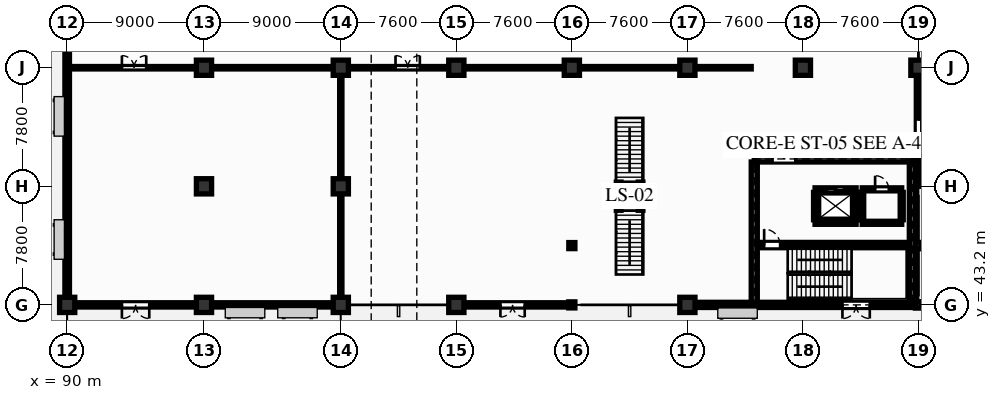
"""IFC4 building model, lengths in metres.
Left out: names, types, materials, properties, quantities, classifications, styles, units other than length and angle.
Written with IfcOpenShell. Run it as: python <this file> out.ifc"""

import sys

from ifc_helpers import new_model, si_unit, direction, frame, frame_2d, origin, origin_2d, place, context, subcontext, project, spatial, rectangle, i_section, extrude, element, fill, save


model = new_model("IFC4")
c1 = context("Model", 3, precision=1e-05, world=origin(), true_north=direction((0.0, 1.0)))
c2 = subcontext(c1, "Body", "Model", "MODEL_VIEW")
j1 = project(units=[si_unit("LENGTHUNIT", "METRE"), si_unit("PLANEANGLEUNIT", "RADIAN")], contexts=[c1])
p1 = place(None, origin())
s1 = spatial("IfcSite", under=j1, at=p1, CompositionType="ELEMENT")
p2 = place(p1, origin())
s2 = spatial("IfcBuilding", under=s1, at=p2, CompositionType="ELEMENT")
p3 = place(p2, origin())
s3 = spatial("IfcBuildingStorey", under=s2, at=p3, CompositionType="ELEMENT", Elevation=0.0)
for number, where, z_axis, x_axis in (
    (1, (90.0, 43.2, 0.0), (0.0, 0.0, 1.0), (1.0, 0.0, 0.0)),
    (2, (99.0, 43.2, 0.0), (0.0, 0.0, 1.0), (1.0, 0.0, 0.0)),
    (3, (99.0, 51.0, 0.0), (0.0, 0.0, 1.0), (1.0, 0.0, 0.0)),
    (4, (99.0, 58.8, 0.0), (0.0, 0.0, 1.0), (1.0, 0.0, 0.0)),
    (5, (108.0, 43.2, 0.0), (0.0, 0.0, 1.0), (1.0, 0.0, 0.0)),
    (6, (108.0, 51.0, 0.0), (0.0, 0.0, 1.0), (1.0, 0.0, 0.0)),
    (7, (108.0, 58.8, 0.0), (0.0, 0.0, 1.0), (1.0, 0.0, 0.0)),
    (8, (115.6, 43.2, 0.0), (0.0, 0.0, 1.0), (1.0, 0.0, 0.0)),
    (9, (115.6, 58.8, 0.0), (0.0, 0.0, 1.0), (1.0, 0.0, 0.0)),
):
    element("IfcColumn", number, at=place(p3, frame(where, z_axis=z_axis, x_axis=x_axis)), inside=s3, PredefinedType="COLUMN", context=c2, shape_type="SweptSolid", body=[
        extrude(rectangle(XDim=1.0, YDim=1.0, at=origin_2d()), origin(), (0.0, 0.0, 1.0), 5.1),
    ])
p4 = place(p3, frame((123.2, 43.2, 0.0), z_axis=(0.0, 0.0, 1.0), x_axis=(1.0, 0.0, 0.0)))
e10 = element("IfcColumn", 10, at=p4, inside=s3, PredefinedType="COLUMN", context=c2, shape_type="SweptSolid", body=[
    extrude(i_section(OverallWidth=0.401, OverallDepth=0.399, WebThickness=0.025, FlangeThickness=0.04, at=origin_2d()), origin(), (0.0, 0.0, 1.0), 5.1),
])
for number, where, z_axis, x_axis in (
    (11, (123.2, 58.8, 0.0), (0.0, 0.0, 1.0), (1.0, 0.0, 0.0)),
    (12, (130.8, 43.2, 0.0), (0.0, 0.0, 1.0), (1.0, 0.0, 0.0)),
    (13, (130.8, 58.8, 0.0), (0.0, 0.0, 1.0), (1.0, 0.0, 0.0)),
    (14, (138.4, 58.8, 0.0), (0.0, 0.0, 1.0), (1.0, 0.0, 0.0)),
    (15, (146.0, 58.8, 0.0), (0.0, 0.0, 1.0), (1.0, 0.0, 0.0)),
):
    element("IfcColumn", number, at=place(p3, frame(where, z_axis=z_axis, x_axis=x_axis)), inside=s3, PredefinedType="COLUMN", context=c2, shape_type="SweptSolid", body=[
        extrude(rectangle(XDim=1.0, YDim=1.0, at=origin_2d()), origin(), (0.0, 0.0, 1.0), 5.1),
    ])
p5 = place(p3, frame((123.2, 47.1, 0.0), z_axis=(0.0, 0.0, 1.0), x_axis=(1.0, 0.0, 0.0)))
e16 = element("IfcColumn", 16, at=p5, inside=s3, PredefinedType="COLUMN", context=c2, shape_type="SweptSolid", body=[
    extrude(i_section(OverallWidth=0.401, OverallDepth=0.399, WebThickness=0.025, FlangeThickness=0.04, at=origin_2d()), origin(), (0.0, 0.0, 1.0), 5.1),
])
for number, where, z_axis, x_axis in (
    (17, (146.0, 47.1, 0.0), (0.0, 0.0, 1.0), (1.0, 0.0, 0.0)),
    (18, (146.0, 43.2, 0.0), (0.0, 0.0, 1.0), (1.0, 0.0, 0.0)),
):
    element("IfcColumn", number, at=place(p3, frame(where, z_axis=z_axis, x_axis=x_axis)), inside=s3, PredefinedType="COLUMN", context=c2, shape_type="SweptSolid", body=[
        extrude(i_section(OverallWidth=0.406, OverallDepth=0.417, WebThickness=0.03, FlangeThickness=0.048, at=origin_2d()), origin(), (0.0, 0.0, 1.0), 5.1),
    ])
for number, where, z_axis, x_axis in (
    (19, (126.28, 49.58, 0.0), (0.0, 0.0, 1.0), (1.0, 0.0, 0.0)),
    (20, (127.72, 49.58, 0.0), (0.0, 0.0, 1.0), (1.0, 0.0, 0.0)),
    (21, (126.28, 51.12, 0.0), (0.0, 0.0, 1.0), (1.0, 0.0, 0.0)),
    (22, (127.72, 51.12, 0.0), (0.0, 0.0, 1.0), (1.0, 0.0, 0.0)),
):
    element("IfcColumn", number, at=place(p3, frame(where, z_axis=z_axis, x_axis=x_axis)), inside=s3, PredefinedType="COLUMN", context=c2, shape_type="SweptSolid", body=[
        extrude(i_section(OverallWidth=0.307, OverallDepth=0.315, WebThickness=0.012, FlangeThickness=0.019, at=origin_2d()), origin(), (0.0, 0.0, 1.0), 2.33),
    ])
p6 = place(p3, frame((90.0, 43.2, 0.0), z_axis=(0.0, 0.0, 1.0), x_axis=(0.0, 1.0, 0.0)))
e23 = element("IfcWall", 23, at=p6, inside=s3, PredefinedType="SOLIDWALL", context=c2, shape_type="SweptSolid", body=[
    extrude(rectangle(XDim=31.2, YDim=0.3, at=frame_2d((15.6, 0.0))), origin(), (0.0, 0.0, 1.0), 5.25),
])
p7 = place(p6, frame((3.5, 0.0, 0.9)))
e24 = element("IfcOpeningElement", 24, at=p7, cuts=e23, PredefinedType="OPENING", context=c2, shape_type="SweptSolid", body=[
    extrude(rectangle(XDim=1.6, YDim=2.05, at=frame_2d((0.8, 1.025))), frame((0.0, 0.16, 0.0), z_axis=(0.0, -1.0, 0.0), x_axis=(1.0, 0.0, 0.0)), (0.0, 0.0, 1.0), 0.32),
])
p8 = place(p6, frame((11.5, 0.0, 0.9)))
e25 = element("IfcOpeningElement", 25, at=p8, cuts=e23, PredefinedType="OPENING", context=c2, shape_type="SweptSolid", body=[
    extrude(rectangle(XDim=1.8, YDim=2.1, at=frame_2d((0.9, 1.05))), frame((0.0, 0.16, 0.0), z_axis=(0.0, -1.0, 0.0), x_axis=(1.0, 0.0, 0.0)), (0.0, 0.0, 1.0), 0.32),
])
p9 = place(p6, frame((19.5, 0.0, 0.9)))
e26 = element("IfcOpeningElement", 26, at=p9, cuts=e23, PredefinedType="OPENING", context=c2, shape_type="SweptSolid", body=[
    extrude(rectangle(XDim=1.6, YDim=2.05, at=frame_2d((0.8, 1.025))), frame((0.0, 0.16, 0.0), z_axis=(0.0, -1.0, 0.0), x_axis=(1.0, 0.0, 0.0)), (0.0, 0.0, 1.0), 0.32),
])
p10 = place(p6, frame((26.2, 0.0, 0.9)))
e27 = element("IfcOpeningElement", 27, at=p10, cuts=e23, PredefinedType="OPENING", context=c2, shape_type="SweptSolid", body=[
    extrude(rectangle(XDim=1.2, YDim=2.1, at=frame_2d((0.6, 1.05))), frame((0.0, 0.16, 0.0), z_axis=(0.0, -1.0, 0.0), x_axis=(1.0, 0.0, 0.0)), (0.0, 0.0, 1.0), 0.32),
])
p11 = place(p3, frame((90.0, 43.2, 0.0), z_axis=(0.0, 0.0, 1.0), x_axis=(1.0, 0.0, 0.0)))
e28 = element("IfcWall", 28, at=p11, inside=s3, PredefinedType="SOLIDWALL", context=c2, shape_type="SweptSolid", body=[
    extrude(rectangle(XDim=18.0, YDim=0.28, at=frame_2d((9.0, 0.0))), origin(), (0.0, 0.0, 1.0), 3.425),
])
p12 = place(p11, frame((3.6, 0.0, 0.0)))
e29 = element("IfcOpeningElement", 29, at=p12, cuts=e28, PredefinedType="OPENING", context=c2, shape_type="SweptSolid", body=[
    extrude(rectangle(XDim=1.8, YDim=2.6, at=frame_2d((0.9, 1.3))), frame((0.0, 0.15, 0.0), z_axis=(0.0, -1.0, 0.0), x_axis=(1.0, 0.0, 0.0)), (0.0, 0.0, 1.0), 0.3),
])
p13 = place(p11, frame((10.8, 0.0, 0.9)))
e30 = element("IfcOpeningElement", 30, at=p13, cuts=e28, PredefinedType="OPENING", context=c2, shape_type="SweptSolid", body=[
    extrude(rectangle(XDim=1.8, YDim=2.1, at=frame_2d((0.9, 1.05))), frame((0.0, 0.15, 0.0), z_axis=(0.0, -1.0, 0.0), x_axis=(1.0, 0.0, 0.0)), (0.0, 0.0, 1.0), 0.3),
])
p14 = place(p11, frame((14.4, 0.0, 0.9)))
e31 = element("IfcOpeningElement", 31, at=p14, cuts=e28, PredefinedType="OPENING", context=c2, shape_type="SweptSolid", body=[
    extrude(rectangle(XDim=1.5, YDim=2.1, at=frame_2d((0.75, 1.05))), frame((0.0, 0.15, 0.0), z_axis=(0.0, -1.0, 0.0), x_axis=(1.0, 0.0, 0.0)), (0.0, 0.0, 1.0), 0.3),
])
p15 = place(p3, frame((115.6, 43.2, 0.0), z_axis=(0.0, 0.0, 1.0), x_axis=(1.0, 0.0, 0.0)))
e32 = element("IfcWall", 32, at=p15, inside=s3, PredefinedType="SOLIDWALL", context=c2, shape_type="SweptSolid", body=[
    extrude(rectangle(XDim=7.6, YDim=0.28, at=frame_2d((3.8, 0.0))), origin(), (0.0, 0.0, 1.0), 4.308),
])
p16 = place(p15, frame((2.9, 0.0, 0.0)))
e33 = element("IfcOpeningElement", 33, at=p16, cuts=e32, PredefinedType="OPENING", context=c2, shape_type="SweptSolid", body=[
    extrude(rectangle(XDim=1.6, YDim=2.4, at=frame_2d((0.8, 1.2))), frame((0.0, 0.15, 0.0), z_axis=(0.0, -1.0, 0.0), x_axis=(1.0, 0.0, 0.0)), (0.0, 0.0, 1.0), 0.3),
])
p17 = place(p3, frame((130.8, 43.2, 0.0), z_axis=(0.0, 0.0, 1.0), x_axis=(1.0, 0.0, 0.0)))
e34 = element("IfcWall", 34, at=p17, inside=s3, PredefinedType="SOLIDWALL", context=c2, shape_type="SweptSolid", body=[
    extrude(rectangle(XDim=15.2, YDim=0.34, at=frame_2d((7.6, 0.0))), origin(), (0.0, 0.0, 1.0), 4.8),
])
p18 = place(p17, frame((10.2, 0.0, 0.0)))
e35 = element("IfcOpeningElement", 35, at=p18, cuts=e34, PredefinedType="OPENING", context=c2, shape_type="SweptSolid", body=[
    extrude(rectangle(XDim=1.8, YDim=2.4, at=frame_2d((0.9, 1.2))), frame((0.0, 0.18, 0.0), z_axis=(0.0, -1.0, 0.0), x_axis=(1.0, 0.0, 0.0)), (0.0, 0.0, 1.0), 0.36),
])
p19 = place(p17, frame((5.2, 0.0, 0.9)))
e36 = element("IfcOpeningElement", 36, at=p19, cuts=e34, PredefinedType="OPENING", context=c2, shape_type="SweptSolid", body=[
    extrude(rectangle(XDim=1.8, YDim=2.1, at=frame_2d((0.9, 1.05))), frame((0.0, 0.18, 0.0), z_axis=(0.0, -1.0, 0.0), x_axis=(1.0, 0.0, 0.0)), (0.0, 0.0, 1.0), 0.36),
])
p20 = place(p3, frame((146.0, 51.0, 0.0), z_axis=(0.0, 0.0, 1.0), x_axis=(0.0, 1.0, 0.0)))
e37 = element("IfcWall", 37, at=p20, inside=s3, PredefinedType="SOLIDWALL", context=c2, shape_type="SweptSolid", body=[
    extrude(rectangle(XDim=7.8, YDim=0.28, at=frame_2d((3.9, 0.0))), origin(), (0.0, 0.0, 1.0), 4.8),
])
p21 = place(p20, frame((2.6, 0.0, 0.0)))
e38 = element("IfcOpeningElement", 38, at=p21, cuts=e37, PredefinedType="OPENING", context=c2, shape_type="SweptSolid", body=[
    extrude(rectangle(XDim=1.8, YDim=2.6, at=frame_2d((0.9, 1.3))), frame((0.0, 0.15, 0.0), z_axis=(0.0, -1.0, 0.0), x_axis=(1.0, 0.0, 0.0)), (0.0, 0.0, 1.0), 0.3),
])
p22 = place(p3, frame((135.2, 52.8, 0.0), z_axis=(0.0, 0.0, 1.0), x_axis=(1.0, 0.0, 0.0)))
e39 = element("IfcWall", 39, at=p22, inside=s3, PredefinedType="SHEAR", context=c2, shape_type="SweptSolid", body=[
    extrude(rectangle(XDim=10.4, YDim=0.4, at=frame_2d((5.2, 0.0))), origin(), (0.0, 0.0, 1.0), 4.8),
])
p23 = place(p22, frame((1.2, 0.0, 0.0)))
e40 = element("IfcOpeningElement", 40, at=p23, cuts=e39, PredefinedType="OPENING", context=c2, shape_type="SweptSolid", body=[
    extrude(rectangle(XDim=1.5, YDim=2.2, at=frame_2d((0.75, 1.1))), frame((0.0, 0.21, 0.0), z_axis=(0.0, -1.0, 0.0), x_axis=(1.0, 0.0, 0.0)), (0.0, 0.0, 1.0), 0.42),
])
for number, where, z_axis, x_axis in (
    (41, (135.2, 43.37, 0.0), (0.0, 0.0, 1.0), (0.0, 1.0, 0.0)),
    (42, (145.6, 43.37, 0.0), (0.0, 0.0, 1.0), (0.0, 1.0, 0.0)),
):
    element("IfcWall", number, at=place(p3, frame(where, z_axis=z_axis, x_axis=x_axis)), inside=s3, PredefinedType="SHEAR", context=c2, shape_type="SweptSolid", body=[
        extrude(rectangle(XDim=9.23, YDim=0.4, at=frame_2d((4.615, 0.0))), origin(), (0.0, 0.0, 1.0), 4.8),
    ])
p24 = place(p3, frame((135.4, 47.135, 0.0), z_axis=(0.0, 0.0, 1.0), x_axis=(1.0, 0.0, 0.0)))
e43 = element("IfcWall", 43, at=p24, inside=s3, PredefinedType="SHEAR", context=c2, shape_type="SweptSolid", body=[
    extrude(rectangle(XDim=10.0, YDim=0.35, at=frame_2d((5.0, 0.0))), origin(), (0.0, 0.0, 1.0), 4.8),
])
p25 = place(p24, frame((0.45, 0.0, 0.0)))
e44 = element("IfcOpeningElement", 44, at=p25, cuts=e43, PredefinedType="OPENING", context=c2, shape_type="SweptSolid", body=[
    extrude(rectangle(XDim=1.05, YDim=2.2, at=frame_2d((0.525, 1.1))), frame((0.0, 0.185, 0.0), z_axis=(0.0, -1.0, 0.0), x_axis=(1.0, 0.0, 0.0)), (0.0, 0.0, 1.0), 0.37),
])
p26 = place(p3, frame((139.2, 48.6, 0.0), z_axis=(0.0, 0.0, 1.0), x_axis=(1.0, 0.0, 0.0)))
e45 = element("IfcWall", 45, at=p26, inside=s3, PredefinedType="PARTITIONING", context=c2, shape_type="SweptSolid", body=[
    extrude(rectangle(XDim=2.7, YDim=0.2, at=frame_2d((1.35, 0.0))), origin(), (0.0, 0.0, 1.0), 4.8),
])
p27 = place(p3, frame((139.2, 50.8, 0.0), z_axis=(0.0, 0.0, 1.0), x_axis=(1.0, 0.0, 0.0)))
e46 = element("IfcWall", 46, at=p27, inside=s3, PredefinedType="PARTITIONING", context=c2, shape_type="SweptSolid", body=[
    extrude(rectangle(XDim=2.7, YDim=0.2, at=frame_2d((1.35, 0.0))), origin(), (0.0, 0.0, 1.0), 4.8),
])
p28 = place(p27, frame((0.8, 0.0, 0.0)))
e47 = element("IfcOpeningElement", 47, at=p28, cuts=e46, PredefinedType="OPENING", context=c2, shape_type="SweptSolid", body=[
    extrude(rectangle(XDim=1.1, YDim=2.15, at=frame_2d((0.55, 1.075))), frame((0.0, 0.11, 0.0), z_axis=(0.0, -1.0, 0.0), x_axis=(1.0, 0.0, 0.0)), (0.0, 0.0, 1.0), 0.22),
])
for number, where, z_axis, x_axis in (
    (48, (139.2, 48.8, 0.0), (0.0, 0.0, 1.0), (0.0, 1.0, 0.0)),
    (49, (141.9, 48.8, 0.0), (0.0, 0.0, 1.0), (0.0, 1.0, 0.0)),
):
    element("IfcWall", number, at=place(p3, frame(where, z_axis=z_axis, x_axis=x_axis)), inside=s3, PredefinedType="PARTITIONING", context=c2, shape_type="SweptSolid", body=[
        extrude(rectangle(XDim=1.8, YDim=0.2, at=frame_2d((0.9, 0.0))), origin(), (0.0, 0.0, 1.0), 4.8),
    ])
p29 = place(p3, frame((142.3, 48.6, 0.0), z_axis=(0.0, 0.0, 1.0), x_axis=(1.0, 0.0, 0.0)))
e50 = element("IfcWall", 50, at=p29, inside=s3, PredefinedType="PARTITIONING", context=c2, shape_type="SweptSolid", body=[
    extrude(rectangle(XDim=2.6, YDim=0.2, at=frame_2d((1.3, 0.0))), origin(), (0.0, 0.0, 1.0), 4.8),
])
p30 = place(p3, frame((142.3, 50.8, 0.0), z_axis=(0.0, 0.0, 1.0), x_axis=(1.0, 0.0, 0.0)))
e51 = element("IfcWall", 51, at=p30, inside=s3, PredefinedType="PARTITIONING", context=c2, shape_type="SweptSolid", body=[
    extrude(rectangle(XDim=2.6, YDim=0.2, at=frame_2d((1.3, 0.0))), origin(), (0.0, 0.0, 1.0), 4.8),
])
p31 = place(p30, frame((0.85, 0.0, 0.0)))
e52 = element("IfcOpeningElement", 52, at=p31, cuts=e51, PredefinedType="OPENING", context=c2, shape_type="SweptSolid", body=[
    extrude(rectangle(XDim=0.9, YDim=2.1, at=frame_2d((0.45, 1.05))), frame((0.0, 0.11, 0.0), z_axis=(0.0, -1.0, 0.0), x_axis=(1.0, 0.0, 0.0)), (0.0, 0.0, 1.0), 0.22),
])
for number, where, z_axis, x_axis in (
    (53, (142.3, 48.8, 0.0), (0.0, 0.0, 1.0), (0.0, 1.0, 0.0)),
    (54, (144.9, 48.8, 0.0), (0.0, 0.0, 1.0), (0.0, 1.0, 0.0)),
):
    element("IfcWall", number, at=place(p3, frame(where, z_axis=z_axis, x_axis=x_axis)), inside=s3, PredefinedType="PARTITIONING", context=c2, shape_type="SweptSolid", body=[
        extrude(rectangle(XDim=1.8, YDim=0.2, at=frame_2d((0.9, 0.0))), origin(), (0.0, 0.0, 1.0), 4.8),
    ])
p32 = place(p3, frame((90.0, 58.8, 0.0), z_axis=(0.0, 0.0, 1.0), x_axis=(1.0, 0.0, 0.0)))
e55 = element("IfcWall", 55, at=p32, inside=s3, PredefinedType="PARTITIONING", context=c2, shape_type="SweptSolid", body=[
    extrude(rectangle(XDim=18.0, YDim=0.16, at=frame_2d((9.0, 0.0))), origin(), (0.0, 0.0, 1.0), 4.153),
])
p33 = place(p32, frame((3.6, 0.0, 0.0)))
e56 = element("IfcOpeningElement", 56, at=p33, cuts=e55, PredefinedType="OPENING", context=c2, shape_type="SweptSolid", body=[
    extrude(rectangle(XDim=1.6, YDim=2.2, at=frame_2d((0.8, 1.1))), frame((0.0, 0.09, 0.0), z_axis=(0.0, -1.0, 0.0), x_axis=(1.0, 0.0, 0.0)), (0.0, 0.0, 1.0), 0.18),
])
p34 = place(p3, frame((108.0, 58.8, 0.0), z_axis=(0.0, 0.0, 1.0), x_axis=(1.0, 0.0, 0.0)))
e57 = element("IfcWall", 57, at=p34, inside=s3, PredefinedType="PARTITIONING", context=c2, shape_type="SweptSolid", body=[
    extrude(rectangle(XDim=27.0, YDim=0.16, at=frame_2d((13.5, 0.0))), origin(), (0.0, 0.0, 1.0), 4.163),
])
p35 = place(p34, frame((3.6, 0.0, 0.0)))
e58 = element("IfcOpeningElement", 58, at=p35, cuts=e57, PredefinedType="OPENING", context=c2, shape_type="SweptSolid", body=[
    extrude(rectangle(XDim=1.6, YDim=2.2, at=frame_2d((0.8, 1.1))), frame((0.0, 0.09, 0.0), z_axis=(0.0, -1.0, 0.0), x_axis=(1.0, 0.0, 0.0)), (0.0, 0.0, 1.0), 0.18),
])
p36 = place(p3, frame((108.0, 43.2, 0.0), z_axis=(0.0, 0.0, 1.0), x_axis=(0.0, 1.0, 0.0)))
e59 = element("IfcWall", 59, at=p36, inside=s3, PredefinedType="PARTITIONING", context=c2, shape_type="SweptSolid", body=[
    extrude(rectangle(XDim=15.6, YDim=0.15, at=frame_2d((7.8, 0.0))), origin(), (0.0, 0.0, 1.0), 4.308),
])
p37 = place(p7, origin())
e60 = element("IfcWindow", 60, at=p37, inside=s3, PartitioningType="SINGLE_PANEL", PredefinedType="WINDOW", context=c2, shape_type="SweptSolid", body=[
    extrude(rectangle(XDim=1.6, YDim=2.05, at=frame_2d((0.8, 1.025))), frame((0.0, 0.03, 0.0), z_axis=(0.0, -1.0, 0.0), x_axis=(1.0, 0.0, 0.0)), (0.0, 0.0, 1.0), 0.06),
])
fill(e24, e60)
p38 = place(p8, origin())
e61 = element("IfcWindow", 61, at=p38, inside=s3, PartitioningType="SINGLE_PANEL", PredefinedType="WINDOW", context=c2, shape_type="SweptSolid", body=[
    extrude(rectangle(XDim=1.8, YDim=2.1, at=frame_2d((0.9, 1.05))), frame((0.0, 0.03, 0.0), z_axis=(0.0, -1.0, 0.0), x_axis=(1.0, 0.0, 0.0)), (0.0, 0.0, 1.0), 0.06),
])
fill(e25, e61)
p39 = place(p12, frame((1.8, 0.0, 0.0), z_axis=(0.0, 0.0, 1.0), x_axis=(-1.0, 0.0, 0.0)))
e62 = element("IfcDoor", 62, at=p39, inside=s3, OperationType="DOUBLE_DOOR_SINGLE_SWING", PredefinedType="DOOR", context=c2, shape_type="SweptSolid", body=[
    extrude(rectangle(XDim=1.8, YDim=2.6, at=frame_2d((0.9, 1.3))), frame((0.0, 0.025, 0.0), z_axis=(0.0, -1.0, 0.0), x_axis=(1.0, 0.0, 0.0)), (0.0, 0.0, 1.0), 0.05),
])
fill(e29, e62)
p40 = place(p13, origin())
e63 = element("IfcWindow", 63, at=p40, inside=s3, PartitioningType="SINGLE_PANEL", PredefinedType="WINDOW", context=c2, shape_type="SweptSolid", body=[
    extrude(rectangle(XDim=1.8, YDim=2.1, at=frame_2d((0.9, 1.05))), frame((0.0, 0.03, 0.0), z_axis=(0.0, -1.0, 0.0), x_axis=(1.0, 0.0, 0.0)), (0.0, 0.0, 1.0), 0.06),
])
fill(e30, e63)
p41 = place(p14, origin())
e64 = element("IfcWindow", 64, at=p41, inside=s3, PartitioningType="SINGLE_PANEL", PredefinedType="WINDOW", context=c2, shape_type="SweptSolid", body=[
    extrude(rectangle(XDim=1.5, YDim=2.1, at=frame_2d((0.75, 1.05))), frame((0.0, 0.03, 0.0), z_axis=(0.0, -1.0, 0.0), x_axis=(1.0, 0.0, 0.0)), (0.0, 0.0, 1.0), 0.06),
])
fill(e31, e64)
p42 = place(p16, frame((1.6, 0.0, 0.0), z_axis=(0.0, 0.0, 1.0), x_axis=(-1.0, 0.0, 0.0)))
e65 = element("IfcDoor", 65, at=p42, inside=s3, OperationType="DOUBLE_DOOR_SINGLE_SWING", PredefinedType="DOOR", context=c2, shape_type="SweptSolid", body=[
    extrude(rectangle(XDim=1.6, YDim=2.4, at=frame_2d((0.8, 1.2))), frame((0.0, 0.025, 0.0), z_axis=(0.0, -1.0, 0.0), x_axis=(1.0, 0.0, 0.0)), (0.0, 0.0, 1.0), 0.05),
])
fill(e33, e65)
p43 = place(p18, frame((1.8, 0.0, 0.0), z_axis=(0.0, 0.0, 1.0), x_axis=(-1.0, 0.0, 0.0)))
e66 = element("IfcDoor", 66, at=p43, inside=s3, OperationType="DOUBLE_DOOR_SINGLE_SWING", PredefinedType="DOOR", context=c2, shape_type="SweptSolid", body=[
    extrude(rectangle(XDim=1.8, YDim=2.4, at=frame_2d((0.9, 1.2))), frame((0.0, 0.025, 0.0), z_axis=(0.0, -1.0, 0.0), x_axis=(1.0, 0.0, 0.0)), (0.0, 0.0, 1.0), 0.05),
])
fill(e35, e66)
p44 = place(p19, origin())
e67 = element("IfcWindow", 67, at=p44, inside=s3, PartitioningType="SINGLE_PANEL", PredefinedType="WINDOW", context=c2, shape_type="SweptSolid", body=[
    extrude(rectangle(XDim=1.8, YDim=2.1, at=frame_2d((0.9, 1.05))), frame((0.0, 0.03, 0.0), z_axis=(0.0, -1.0, 0.0), x_axis=(1.0, 0.0, 0.0)), (0.0, 0.0, 1.0), 0.06),
])
fill(e36, e67)
p45 = place(p21, frame((1.8, 0.0, 0.0), z_axis=(0.0, 0.0, 1.0), x_axis=(-1.0, 0.0, 0.0)))
e68 = element("IfcDoor", 68, at=p45, inside=s3, OperationType="DOUBLE_DOOR_SINGLE_SWING", PredefinedType="DOOR", context=c2, shape_type="SweptSolid", body=[
    extrude(rectangle(XDim=1.8, YDim=2.6, at=frame_2d((0.9, 1.3))), frame((0.0, 0.025, 0.0), z_axis=(0.0, -1.0, 0.0), x_axis=(1.0, 0.0, 0.0)), (0.0, 0.0, 1.0), 0.05),
])
fill(e38, e68)
p46 = place(p23, origin())
e69 = element("IfcDoor", 69, at=p46, inside=s3, OperationType="DOUBLE_DOOR_SINGLE_SWING", PredefinedType="DOOR", context=c2, shape_type="SweptSolid", body=[
    extrude(rectangle(XDim=1.5, YDim=2.2, at=frame_2d((0.75, 1.1))), frame((0.0, 0.025, 0.0), z_axis=(0.0, -1.0, 0.0), x_axis=(1.0, 0.0, 0.0)), (0.0, 0.0, 1.0), 0.05),
])
fill(e40, e69)
p47 = place(p25, origin())
e70 = element("IfcDoor", 70, at=p47, inside=s3, OperationType="SINGLE_SWING_LEFT", PredefinedType="DOOR", context=c2, shape_type="SweptSolid", body=[
    extrude(rectangle(XDim=1.05, YDim=2.2, at=frame_2d((0.525, 1.1))), frame((0.0, 0.025, 0.0), z_axis=(0.0, -1.0, 0.0), x_axis=(1.0, 0.0, 0.0)), (0.0, 0.0, 1.0), 0.05),
])
fill(e44, e70)
p48 = place(p28, origin())
e71 = element("IfcDoor", 71, at=p48, inside=s3, OperationType="SLIDING_TO_LEFT", PredefinedType="DOOR", context=c2, shape_type="SweptSolid", body=[
    extrude(rectangle(XDim=1.1, YDim=2.15, at=frame_2d((0.55, 1.075))), frame((0.0, 0.025, 0.0), z_axis=(0.0, -1.0, 0.0), x_axis=(1.0, 0.0, 0.0)), (0.0, 0.0, 1.0), 0.05),
])
fill(e47, e71)
p49 = place(p31, origin())
e72 = element("IfcDoor", 72, at=p49, inside=s3, OperationType="SINGLE_SWING_LEFT", PredefinedType="DOOR", context=c2, shape_type="SweptSolid", body=[
    extrude(rectangle(XDim=0.9, YDim=2.1, at=frame_2d((0.45, 1.05))), frame((0.0, 0.025, 0.0), z_axis=(0.0, -1.0, 0.0), x_axis=(1.0, 0.0, 0.0)), (0.0, 0.0, 1.0), 0.05),
])
fill(e52, e72)
p50 = place(p33, origin())
e73 = element("IfcDoor", 73, at=p50, inside=s3, OperationType="DOUBLE_DOOR_SINGLE_SWING", PredefinedType="DOOR", context=c2, shape_type="SweptSolid", body=[
    extrude(rectangle(XDim=1.6, YDim=2.2, at=frame_2d((0.8, 1.1))), frame((0.0, 0.025, 0.0), z_axis=(0.0, -1.0, 0.0), x_axis=(1.0, 0.0, 0.0)), (0.0, 0.0, 1.0), 0.05),
])
fill(e56, e73)
p51 = place(p35, origin())
e74 = element("IfcDoor", 74, at=p51, inside=s3, OperationType="DOUBLE_DOOR_SINGLE_SWING", PredefinedType="DOOR", context=c2, shape_type="SweptSolid", body=[
    extrude(rectangle(XDim=1.6, YDim=2.2, at=frame_2d((0.8, 1.1))), frame((0.0, 0.025, 0.0), z_axis=(0.0, -1.0, 0.0), x_axis=(1.0, 0.0, 0.0)), (0.0, 0.0, 1.0), 0.05),
])
fill(e58, e74)
save(model, sys.argv[1])
